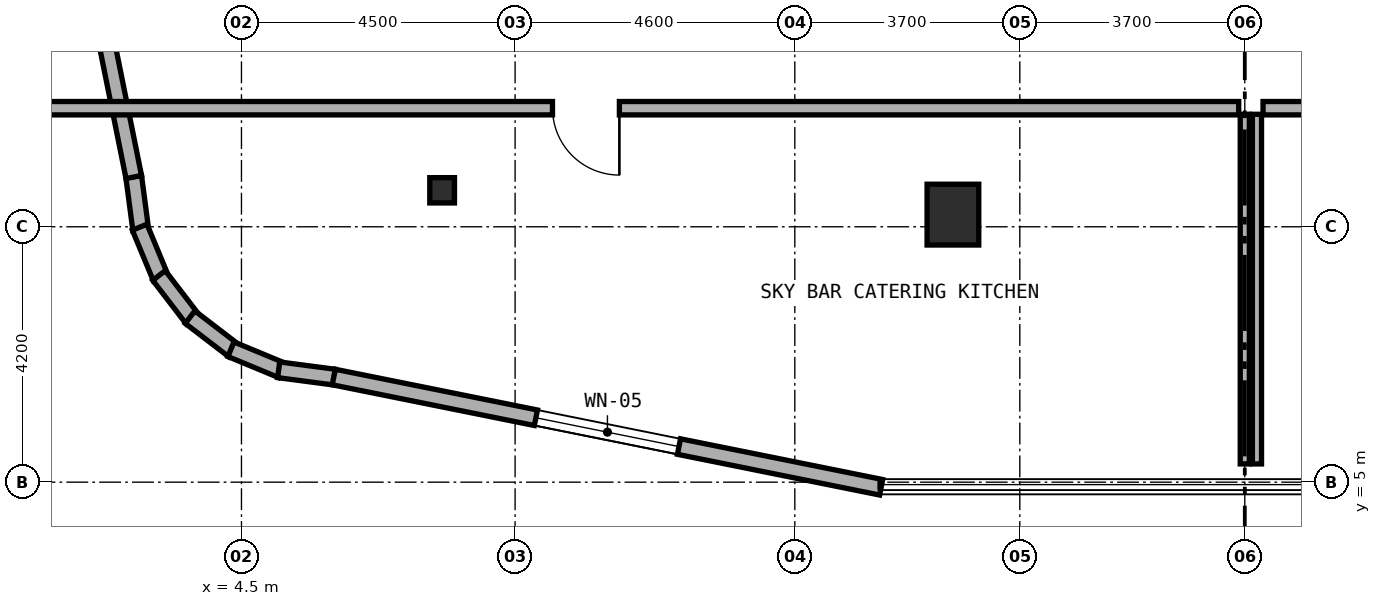
"""IFC4 building model, lengths in metres.
Left out: names, types, materials, properties, quantities, classifications, styles, units other than length and angle.
Written with IfcOpenShell. Run it as: python <this file> out.ifc"""

import sys

from ifc_helpers import new_model, si_unit, direction, frame, frame_2d, origin, origin_2d, place, context, subcontext, project, spatial, rectangle, i_section, extrude, element, fill, save


model = new_model("IFC4")
c1 = context("Model", 3, precision=1e-05, world=origin(), true_north=direction((0.0, 1.0)))
c2 = subcontext(c1, "Body", "Model", "MODEL_VIEW")
j1 = project(units=[si_unit("LENGTHUNIT", "METRE"), si_unit("PLANEANGLEUNIT", "RADIAN")], contexts=[c1])
p1 = place(None, origin())
s1 = spatial("IfcSite", under=j1, at=p1, CompositionType="ELEMENT")
p2 = place(p1, origin())
s2 = spatial("IfcBuilding", under=s1, at=p2, CompositionType="ELEMENT")
p3 = place(p2, frame((0.0, 0.0, 119.5)))
s3 = spatial("IfcBuildingStorey", under=s2, at=p3, CompositionType="ELEMENT", Elevation=119.5)
p4 = place(p3, frame((16.2, 9.4, 0.0), z_axis=(0.0, 0.0, 1.0), x_axis=(1.0, 0.0, 0.0)))
e1 = element("IfcColumn", 1, at=p4, inside=s3, PredefinedType="COLUMN", context=c2, shape_type="SweptSolid", body=[
    extrude(rectangle(XDim=0.85, YDim=1.0, at=origin_2d()), origin(), (0.0, 0.0, 1.0), 4.5),
])
p5 = place(p3, frame((7.8, 9.8, 0.0), z_axis=(0.0, 0.0, 1.0), x_axis=(1.0, 0.0, 0.0)))
e2 = element("IfcColumn", 2, at=p5, inside=s3, PredefinedType="COLUMN", context=c2, shape_type="SweptSolid", body=[
    extrude(i_section(OverallWidth=0.406, OverallDepth=0.416, WebThickness=0.024, FlangeThickness=0.039, FilletRadius=0.015, at=origin_2d()), origin(), (0.0, 0.0, 1.0), 4.5),
])
p6 = place(p3, frame((2.728, 10.025, 0.0), z_axis=(0.0, 0.0, 1.0), x_axis=(0.130953706898, -0.991388484223, 0.0)))
e3 = element("IfcWall", 3, at=p6, inside=s3, PredefinedType="STANDARD", context=c2, shape_type="SweptSolid", body=[
    extrude(rectangle(XDim=0.885, YDim=0.26, at=frame_2d((0.443, 0.0))), origin(), (0.0, 0.0, 1.0), 4.22),
])
p7 = place(p3, frame((2.826, 9.193, 0.0), z_axis=(0.0, 0.0, 1.0), x_axis=(0.383290660547, -0.923627776508, 0.0)))
e4 = element("IfcWall", 4, at=p7, inside=s3, PredefinedType="STANDARD", context=c2, shape_type="SweptSolid", body=[
    extrude(rectangle(XDim=0.903, YDim=0.26, at=frame_2d((0.452, 0.0))), origin(), (0.0, 0.0, 1.0), 4.22),
])
p8 = place(p3, frame((3.144, 8.399, 0.0), z_axis=(0.0, 0.0, 1.0), x_axis=(0.608624690463, -0.793458244748, 0.0)))
e5 = element("IfcWall", 5, at=p8, inside=s3, PredefinedType="STANDARD", context=c2, shape_type="SweptSolid", body=[
    extrude(rectangle(XDim=0.902, YDim=0.26, at=frame_2d((0.451, 0.0))), origin(), (0.0, 0.0, 1.0), 4.22),
])
p9 = place(p3, frame((3.655, 7.714, 0.0), z_axis=(0.0, 0.0, 1.0), x_axis=(0.793558456666, -0.608494022858, 0.0)))
e6 = element("IfcWall", 6, at=p9, inside=s3, PredefinedType="STANDARD", context=c2, shape_type="SweptSolid", body=[
    extrude(rectangle(XDim=0.902, YDim=0.26, at=frame_2d((0.451, 0.0))), origin(), (0.0, 0.0, 1.0), 4.22),
])
p10 = place(p3, frame((4.327, 7.186, 0.0), z_axis=(0.0, 0.0, 1.0), x_axis=(0.923683767999, -0.383155708213, 0.0)))
e7 = element("IfcWall", 7, at=p10, inside=s3, PredefinedType="STANDARD", context=c2, shape_type="SweptSolid", body=[
    extrude(rectangle(XDim=0.903, YDim=0.26, at=frame_2d((0.451, 0.0))), origin(), (0.0, 0.0, 1.0), 4.22),
])
p11 = place(p3, frame((5.112, 6.848, 0.0), z_axis=(0.0, 0.0, 1.0), x_axis=(0.991487658083, -0.130200706103, 0.0)))
e8 = element("IfcWall", 8, at=p11, inside=s3, PredefinedType="STANDARD", context=c2, shape_type="SweptSolid", body=[
    extrude(rectangle(XDim=0.921, YDim=0.26, at=frame_2d((0.46, 0.0))), origin(), (0.0, 0.0, 1.0), 4.22),
])
p12 = place(p3, frame((6.018, 6.729, 0.0), z_axis=(0.0, 0.0, 1.0), x_axis=(0.980315963543, -0.197435082048, 0.0)))
e9 = element("IfcWall", 9, at=p12, inside=s3, PredefinedType="STANDARD", context=c2, shape_type="SweptSolid", body=[
    extrude(rectangle(XDim=9.183, YDim=0.26, at=frame_2d((4.591, 0.0))), origin(), (0.0, 0.0, 1.0), 4.22),
])
p13 = place(p12, frame((3.391, 0.0, 0.8)))
e10 = element("IfcOpeningElement", 10, at=p13, cuts=e9, PredefinedType="OPENING", context=c2, shape_type="SweptSolid", body=[
    extrude(rectangle(XDim=2.4, YDim=1.6, at=frame_2d((1.2, 0.8))), frame((0.0, 0.14, 0.0), z_axis=(0.0, -1.0, 0.0), x_axis=(1.0, 0.0, 0.0)), (0.0, 0.0, 1.0), 0.28),
])
p14 = place(p3, frame((0.916, 19.02, 0.0), z_axis=(0.0, 0.0, 1.0), x_axis=(0.197435082048, -0.980315963543, 0.0)))
e11 = element("IfcWall", 11, at=p14, inside=s3, PredefinedType="STANDARD", context=c2, shape_type="SweptSolid", body=[
    extrude(rectangle(XDim=9.183, YDim=0.26, at=frame_2d((4.591, 0.0))), origin(), (0.0, 0.0, 1.0), 4.22),
])
p15 = place(p14, frame((3.513, 0.0, 0.8)))
e12 = element("IfcOpeningElement", 12, at=p15, cuts=e11, PredefinedType="OPENING", context=c2, shape_type="SweptSolid", body=[
    extrude(rectangle(XDim=2.4, YDim=1.6, at=frame_2d((1.2, 0.8))), frame((0.0, 0.14, 0.0), z_axis=(0.0, -1.0, 0.0), x_axis=(1.0, 0.0, 0.0)), (0.0, 0.0, 1.0), 0.28),
])
p16 = place(p3, frame((21.0, 5.3, 0.0), z_axis=(0.0, 0.0, 1.0), x_axis=(0.0, 1.0, 0.0)))
e13 = element("IfcWall", 13, at=p16, inside=s3, PredefinedType="PARTITIONING", context=c2, shape_type="SweptSolid", body=[
    extrude(rectangle(XDim=5.75, YDim=0.15, at=frame_2d((2.875, 0.0))), origin(), (0.0, 0.0, 1.0), 3.835),
])
p17 = place(p3, frame((1.3, 11.15, 0.0), z_axis=(0.0, 0.0, 1.0), x_axis=(1.0, 0.0, 0.0)))
e14 = element("IfcWall", 14, at=p17, inside=s3, PredefinedType="SOLIDWALL", context=c2, shape_type="SweptSolid", body=[
    extrude(rectangle(XDim=19.6, YDim=0.22, at=frame_2d((9.8, 0.0))), origin(), (0.0, 0.0, 1.0), 3.695),
])
p18 = place(p17, frame((8.315, 0.0, 0.0)))
e15 = element("IfcOpeningElement", 15, at=p18, cuts=e14, PredefinedType="OPENING", context=c2, shape_type="SweptSolid", body=[
    extrude(rectangle(XDim=1.1, YDim=2.1, at=frame_2d((0.55, 1.05))), frame((0.0, 0.12, 0.0), z_axis=(0.0, -1.0, 0.0), x_axis=(1.0, 0.0, 0.0)), (0.0, 0.0, 1.0), 0.24),
])
p19 = place(p3, frame((21.2, 5.3, 0.0), z_axis=(0.0, 0.0, 1.0), x_axis=(0.0, 1.0, 0.0)))
e16 = element("IfcWall", 16, at=p19, inside=s3, PredefinedType="PARTITIONING", context=c2, shape_type="SweptSolid", body=[
    extrude(rectangle(XDim=5.75, YDim=0.15, at=frame_2d((2.875, 0.0))), origin(), (0.0, 0.0, 1.0), 3.835),
])
p20 = place(p3, frame((21.3, 11.15, 0.0), z_axis=(0.0, 0.0, 1.0), x_axis=(1.0, 0.0, 0.0)))
e17 = element("IfcWall", 17, at=p20, inside=s3, PredefinedType="SOLIDWALL", context=c2, shape_type="SweptSolid", body=[
    extrude(rectangle(XDim=19.4, YDim=0.22, at=frame_2d((9.7, 0.0))), origin(), (0.0, 0.0, 1.0), 3.695),
])
p21 = place(p20, frame((8.225, 0.0, 0.0)))
e18 = element("IfcOpeningElement", 18, at=p21, cuts=e17, PredefinedType="OPENING", context=c2, shape_type="SweptSolid", body=[
    extrude(rectangle(XDim=1.1, YDim=2.1, at=frame_2d((0.55, 1.05))), frame((0.0, 0.12, 0.0), z_axis=(0.0, -1.0, 0.0), x_axis=(1.0, 0.0, 0.0)), (0.0, 0.0, 1.0), 0.24),
])
p22 = place(p13, origin())
e19 = element("IfcWindow", 19, at=p22, inside=s3, PartitioningType="SINGLE_PANEL", PredefinedType="WINDOW", context=c2, shape_type="SweptSolid", body=[
    extrude(rectangle(XDim=2.4, YDim=1.6, at=frame_2d((1.2, 0.8))), frame((0.0, 0.03, 0.0), z_axis=(0.0, -1.0, 0.0), x_axis=(1.0, 0.0, 0.0)), (0.0, 0.0, 1.0), 0.06),
])
fill(e10, e19)
p23 = place(p18, frame((1.1, 0.0, 0.0), z_axis=(0.0, 0.0, 1.0), x_axis=(-1.0, 0.0, 0.0)))
e20 = element("IfcDoor", 20, at=p23, inside=s3, OperationType="SINGLE_SWING_LEFT", PredefinedType="DOOR", context=c2, shape_type="SweptSolid", body=[
    extrude(rectangle(XDim=1.1, YDim=2.1, at=frame_2d((0.55, 1.05))), frame((0.0, 0.025, 0.0), z_axis=(0.0, -1.0, 0.0), x_axis=(1.0, 0.0, 0.0)), (0.0, 0.0, 1.0), 0.05),
])
fill(e15, e20)
save(model, sys.argv[1])
